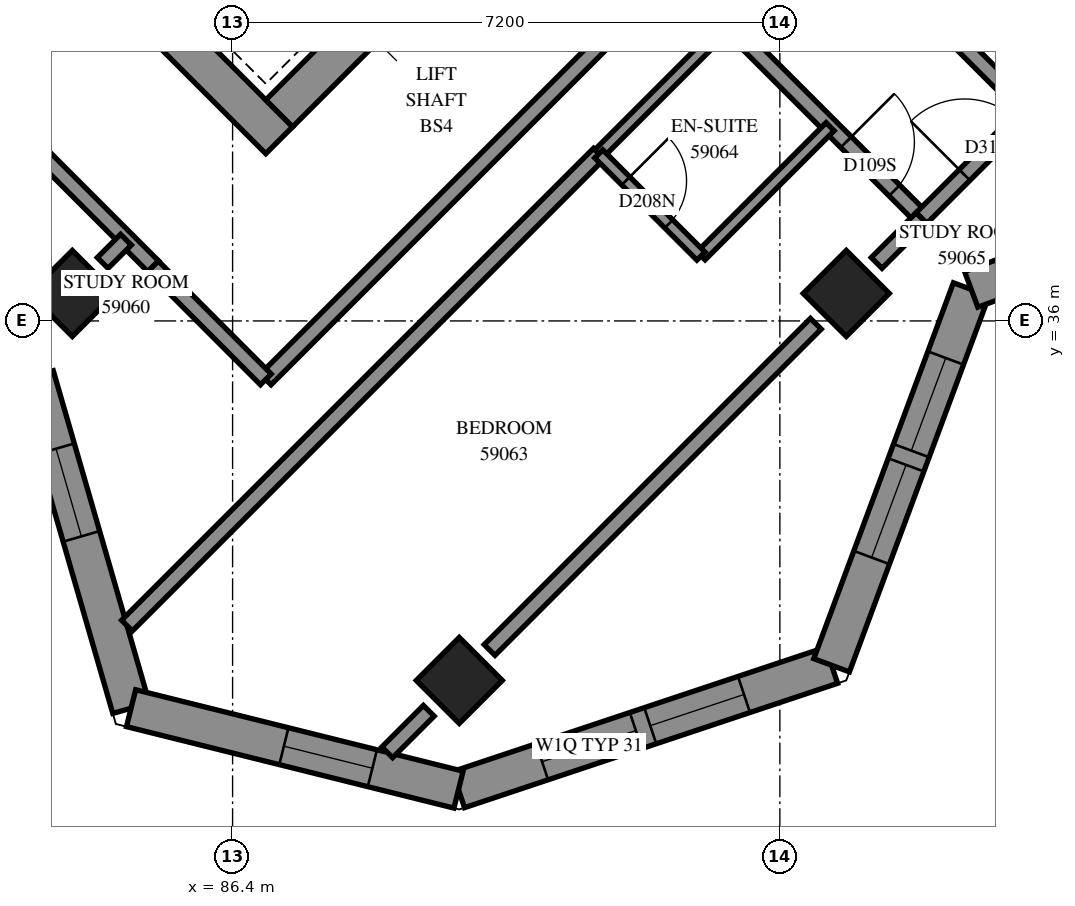
"""IFC4 building model, lengths in metres.
Left out: names, types, materials, properties, quantities, classifications, styles, units other than length and angle.
Written with IfcOpenShell. Run it as: python <this file> out.ifc"""

import sys

from ifc_helpers import new_model, si_unit, direction, frame, frame_2d, origin, origin_2d, place, context, subcontext, project, spatial, polyline, rectangle, outline, extrude, element, fill, save


model = new_model("IFC4")
c1 = context("Model", 3, precision=1e-05, world=origin(), true_north=direction((0.0, 1.0)))
c2 = subcontext(c1, "Body", "Model", "MODEL_VIEW")
j1 = project(units=[si_unit("LENGTHUNIT", "METRE"), si_unit("PLANEANGLEUNIT", "RADIAN")], contexts=[c1])
p1 = place(None, origin())
s1 = spatial("IfcSite", under=j1, at=p1, CompositionType="ELEMENT")
p2 = place(p1, origin())
s2 = spatial("IfcBuilding", under=s1, at=p2, CompositionType="ELEMENT")
p3 = place(p2, frame((0.0, 0.0, 216.8)))
s3 = spatial("IfcBuildingStorey", under=s2, at=p3, CompositionType="ELEMENT", Elevation=216.8)
for number, where, z_axis, x_axis in (
    (1, (84.291, 36.362, 0.0), (0.0, 0.0, 1.0), (0.707, -0.707, 0.0)),
    (2, (94.474, 36.362, 0.0), (0.0, 0.0, 1.0), (0.707, -0.707, 0.0)),
    (3, (89.382, 31.271, 0.0), (0.0, 0.0, 1.0), (0.707, -0.707, 0.0)),
):
    element("IfcColumn", number, at=place(p3, frame(where, z_axis=z_axis, x_axis=x_axis)), inside=s3, PredefinedType="COLUMN", context=c2, shape_type="SweptSolid", body=[
        extrude(rectangle(XDim=0.8, YDim=0.8, at=origin_2d()), origin(), (0.0, 0.0, 1.0), 3.1),
    ])
p4 = place(p3, frame((76.124, 49.267, -0.3), z_axis=(0.0, 0.0, 1.0), x_axis=(0.7071067812, -0.7071067812, 0.0)))
e4 = element("IfcWall", 4, at=p4, inside=s3, PredefinedType="SHEAR", context=c2, shape_type="SweptSolid", body=[
    extrude(rectangle(XDim=15.4, YDim=0.5, at=frame_2d((7.7, 0.0))), origin(), (0.0, 0.0, 1.0), 2.7),
])
p5 = place(p3, frame((87.013, 38.731, -0.3), z_axis=(0.0, 0.0, 1.0), x_axis=(0.7071067812, 0.7071067812, 0.0)))
e5 = element("IfcWall", 5, at=p5, inside=s3, PredefinedType="SHEAR", context=c2, shape_type="SweptSolid", body=[
    extrude(rectangle(XDim=14.4, YDim=0.5, at=frame_2d((7.2, 0.0))), origin(), (0.0, 0.0, 1.0), 2.7),
])
p6 = place(p5, frame((4.55, 0.0, 0.3)))
e6 = element("IfcOpeningElement", 6, at=p6, cuts=e5, PredefinedType="OPENING", context=c2, shape_type="SweptSolid", body=[
    extrude(rectangle(XDim=1.1, YDim=2.1, at=frame_2d((0.55, 1.05))), frame((0.0, 0.26, 0.0), z_axis=(0.0, -1.0, 0.0), x_axis=(1.0, 0.0, 0.0)), (0.0, 0.0, 1.0), 0.52),
])
p7 = place(p5, frame((11.35, 0.0, 0.3)))
e7 = element("IfcOpeningElement", 7, at=p7, cuts=e5, PredefinedType="OPENING", context=c2, shape_type="SweptSolid", body=[
    extrude(rectangle(XDim=1.1, YDim=2.1, at=frame_2d((0.55, 1.05))), frame((0.0, 0.26, 0.0), z_axis=(0.0, -1.0, 0.0), x_axis=(1.0, 0.0, 0.0)), (0.0, 0.0, 1.0), 0.52),
])
p8 = place(p3, frame((89.372, 29.834, 0.0), z_axis=(0.0, 0.0, 1.0), x_axis=(0.9486832981, 0.316227766, 0.0)))
e8 = element("IfcWall", 8, at=p8, inside=s3, PredefinedType="SOLIDWALL", context=c2, shape_type="SweptSolid", body=[
    extrude(outline(polyline([(-0.073, -0.25), (5.294, -0.25), (5.054, 0.25), (0.073, 0.25), (-0.073, -0.25)])), origin(), (0.0, 0.0, 1.0), 3.1),
])
p9 = place(p8, frame((1.159, 0.0, 0.45)))
e9 = element("IfcOpeningElement", 9, at=p9, cuts=e8, PredefinedType="OPENING", context=c2, shape_type="SweptSolid", body=[
    extrude(rectangle(XDim=1.3, YDim=2.5, at=frame_2d((0.65, 1.25))), frame((0.0, 0.26, 0.0), z_axis=(0.0, -1.0, 0.0), x_axis=(1.0, 0.0, 0.0)), (0.0, 0.0, 1.0), 0.52),
])
p10 = place(p8, frame((2.659, 0.0, 0.45)))
e10 = element("IfcOpeningElement", 10, at=p10, cuts=e8, PredefinedType="OPENING", context=c2, shape_type="SweptSolid", body=[
    extrude(rectangle(XDim=1.3, YDim=2.5, at=frame_2d((0.65, 1.25))), frame((0.0, 0.26, 0.0), z_axis=(0.0, -1.0, 0.0), x_axis=(1.0, 0.0, 0.0)), (0.0, 0.0, 1.0), 0.52),
])
p11 = place(p3, frame((94.281, 31.47, 0.0), z_axis=(0.0, 0.0, 1.0), x_axis=(0.3481903374, 0.9374238577, 0.0)))
e11 = element("IfcWall", 11, at=p11, inside=s3, PredefinedType="SOLIDWALL", context=c2, shape_type="SweptSolid", body=[
    extrude(outline(polyline([(-0.12, -0.25), (5.16, -0.25), (5.39, 0.25), (0.12, 0.25), (-0.12, -0.25)])), origin(), (0.0, 0.0, 1.0), 3.1),
])
p12 = place(p11, frame((1.512, 0.0, 0.45)))
e12 = element("IfcOpeningElement", 12, at=p12, cuts=e11, PredefinedType="OPENING", context=c2, shape_type="SweptSolid", body=[
    extrude(rectangle(XDim=1.3, YDim=2.5, at=frame_2d((0.65, 1.25))), frame((0.0, 0.26, 0.0), z_axis=(0.0, -1.0, 0.0), x_axis=(1.0, 0.0, 0.0)), (0.0, 0.0, 1.0), 0.52),
])
p13 = place(p11, frame((3.012, 0.0, 0.45)))
e13 = element("IfcOpeningElement", 13, at=p13, cuts=e11, PredefinedType="OPENING", context=c2, shape_type="SweptSolid", body=[
    extrude(rectangle(XDim=1.3, YDim=2.5, at=frame_2d((0.65, 1.25))), frame((0.0, 0.26, 0.0), z_axis=(0.0, -1.0, 0.0), x_axis=(1.0, 0.0, 0.0)), (0.0, 0.0, 1.0), 0.52),
])
p14 = place(p3, frame((96.118, 36.415, 0.0), z_axis=(0.0, 0.0, 1.0), x_axis=(0.9374238577, 0.3481903374, 0.0)))
e14 = element("IfcWall", 14, at=p14, inside=s3, PredefinedType="SOLIDWALL", context=c2, shape_type="SweptSolid", body=[
    extrude(outline(polyline([(0.115, -0.25), (5.395, -0.25), (5.155, 0.25), (-0.115, 0.25), (0.115, -0.25)])), origin(), (0.0, 0.0, 1.0), 3.1),
])
p15 = place(p14, frame((1.655, 0.0, 0.45)))
e15 = element("IfcOpeningElement", 15, at=p15, cuts=e14, PredefinedType="OPENING", context=c2, shape_type="SweptSolid", body=[
    extrude(rectangle(XDim=1.3, YDim=2.5, at=frame_2d((0.65, 1.25))), frame((0.0, 0.26, 0.0), z_axis=(0.0, -1.0, 0.0), x_axis=(1.0, 0.0, 0.0)), (0.0, 0.0, 1.0), 0.52),
])
p16 = place(p14, frame((3.155, 0.0, 0.45)))
e16 = element("IfcOpeningElement", 16, at=p16, cuts=e14, PredefinedType="OPENING", context=c2, shape_type="SweptSolid", body=[
    extrude(rectangle(XDim=1.3, YDim=2.5, at=frame_2d((0.65, 1.25))), frame((0.0, 0.26, 0.0), z_axis=(0.0, -1.0, 0.0), x_axis=(1.0, 0.0, 0.0)), (0.0, 0.0, 1.0), 0.52),
])
p17 = place(p3, frame((83.801, 35.276, 0.0), z_axis=(0.0, 0.0, 1.0), x_axis=(0.2777474642, -0.9606541241, 0.0)))
e17 = element("IfcWall", 17, at=p17, inside=s3, PredefinedType="SOLIDWALL", context=c2, shape_type="SweptSolid", body=[
    extrude(outline(polyline([(0.138, -0.25), (4.694, -0.25), (4.406, 0.25), (-0.138, 0.25), (0.138, -0.25)])), origin(), (0.0, 0.0, 1.0), 3.1),
])
p18 = place(p17, frame((0.997, 0.0, 0.45)))
e18 = element("IfcOpeningElement", 18, at=p18, cuts=e17, PredefinedType="OPENING", context=c2, shape_type="SweptSolid", body=[
    extrude(rectangle(XDim=1.2, YDim=2.5, at=frame_2d((0.6, 1.25))), frame((0.0, 0.26, 0.0), z_axis=(0.0, -1.0, 0.0), x_axis=(1.0, 0.0, 0.0)), (0.0, 0.0, 1.0), 0.52),
])
p19 = place(p3, frame((85.064, 30.905, 0.0), z_axis=(0.0, 0.0, 1.0), x_axis=(0.9704161722, -0.2414383002, 0.0)))
e19 = element("IfcWall", 19, at=p19, inside=s3, PredefinedType="SOLIDWALL", context=c2, shape_type="SweptSolid", body=[
    extrude(outline(polyline([(-0.144, -0.25), (4.512, -0.25), (4.367, 0.25), (0.144, 0.25), (-0.144, -0.25)])), origin(), (0.0, 0.0, 1.0), 3.1),
])
p20 = place(p19, frame((2.071, 0.0, 0.45)))
e20 = element("IfcOpeningElement", 20, at=p20, cuts=e19, PredefinedType="OPENING", context=c2, shape_type="SweptSolid", body=[
    extrude(rectangle(XDim=1.2, YDim=2.5, at=frame_2d((0.6, 1.25))), frame((0.0, 0.26, 0.0), z_axis=(0.0, -1.0, 0.0), x_axis=(1.0, 0.0, 0.0)), (0.0, 0.0, 1.0), 0.52),
])
p21 = place(p3, frame((85.01, 31.992, 0.0), z_axis=(0.0, 0.0, 1.0), x_axis=(0.7071010869, 0.7071124754, 0.0)))
e21 = element("IfcWall", 21, at=p21, inside=s3, PredefinedType="PARTITIONING", context=c2, shape_type="SweptSolid", body=[
    extrude(rectangle(XDim=8.781, YDim=0.2, at=frame_2d((4.39, 0.0))), origin(), (0.0, 0.0, 1.0), 3.1),
])
p22 = place(p3, frame((86.835, 35.231, 0.0), z_axis=(0.0, 0.0, 1.0), x_axis=(0.7071067812, 0.7071067812, 0.0)))
e22 = element("IfcWall", 22, at=p22, inside=s3, PredefinedType="PARTITIONING", context=c2, shape_type="SweptSolid", body=[
    extrude(rectangle(XDim=7.6, YDim=0.2, at=frame_2d((3.8, 0.0))), origin(), (0.0, 0.0, 1.0), 3.1),
])
p23 = place(p22, frame((6.346, 0.0, 0.0)))
e23 = element("IfcOpeningElement", 23, at=p23, cuts=e22, PredefinedType="OPENING", context=c2, shape_type="SweptSolid", body=[
    extrude(rectangle(XDim=1.0, YDim=2.1, at=frame_2d((0.5, 1.05))), frame((0.0, 0.11, 0.0), z_axis=(0.0, -1.0, 0.0), x_axis=(1.0, 0.0, 0.0)), (0.0, 0.0, 1.0), 0.22),
])
p24 = place(p3, frame((80.522, 41.553, 0.0), z_axis=(0.0, 0.0, 1.0), x_axis=(0.7071067812, -0.7071067812, 0.0)))
e24 = element("IfcWall", 24, at=p24, inside=s3, PredefinedType="PARTITIONING", context=c2, shape_type="SweptSolid", body=[
    extrude(rectangle(XDim=6.836, YDim=0.2, at=frame_2d((3.418, 0.0))), origin(), (0.0, 0.0, 1.0), 3.1),
])
p25 = place(p3, frame((89.781, 31.671, 0.0), z_axis=(0.0, 0.0, 1.0), x_axis=(0.7071067812, 0.7071067812, 0.0)))
e25 = element("IfcWall", 25, at=p25, inside=s3, PredefinedType="PARTITIONING", context=c2, shape_type="SweptSolid", body=[
    extrude(rectangle(XDim=6.07, YDim=0.2, at=frame_2d((3.035, 0.0))), origin(), (0.0, 0.0, 1.0), 2.6),
])
p26 = place(p3, frame((93.623, 42.015, 0.0), z_axis=(0.0, 0.0, 1.0), x_axis=(0.7071067812, -0.7071067812, 0.0)))
e26 = element("IfcWall", 26, at=p26, inside=s3, PredefinedType="PARTITIONING", context=c2, shape_type="SweptSolid", body=[
    extrude(rectangle(XDim=4.599, YDim=0.2, at=frame_2d((2.3, 0.0))), origin(), (0.0, 0.0, 1.0), 3.1),
])
p27 = place(p26, frame((1.349, 0.0, 0.0)))
e27 = element("IfcOpeningElement", 27, at=p27, cuts=e26, PredefinedType="OPENING", context=c2, shape_type="SweptSolid", body=[
    extrude(rectangle(XDim=0.9, YDim=2.1, at=frame_2d((0.45, 1.05))), frame((0.0, 0.11, 0.0), z_axis=(0.0, -1.0, 0.0), x_axis=(1.0, 0.0, 0.0)), (0.0, 0.0, 1.0), 0.22),
])
p28 = place(p3, frame((92.216, 40.608, 0.0), z_axis=(0.0, 0.0, 1.0), x_axis=(0.7071067812, -0.7071067812, 0.0)))
e28 = element("IfcWall", 28, at=p28, inside=s3, PredefinedType="PARTITIONING", context=c2, shape_type="SweptSolid", body=[
    extrude(rectangle(XDim=4.599, YDim=0.2, at=frame_2d((2.3, 0.0))), origin(), (0.0, 0.0, 1.0), 3.1),
])
p29 = place(p28, frame((3.189, 0.0, 0.0)))
e29 = element("IfcOpeningElement", 29, at=p29, cuts=e28, PredefinedType="OPENING", context=c2, shape_type="SweptSolid", body=[
    extrude(rectangle(XDim=0.9, YDim=2.1, at=frame_2d((0.45, 1.05))), frame((0.0, 0.11, 0.0), z_axis=(0.0, -1.0, 0.0), x_axis=(1.0, 0.0, 0.0)), (0.0, 0.0, 1.0), 0.22),
])
for number, where, z_axis, x_axis in (
    (30, (92.563, 36.857, 0.0), (0.0, 0.0, 1.0), (0.707, 0.707, 0.0)),
    (31, (91.219, 38.201, 0.0), (0.0, 0.0, 1.0), (0.707, 0.707, 0.0)),
):
    element("IfcWall", number, at=place(p3, frame(where, z_axis=z_axis, x_axis=x_axis)), inside=s3, PredefinedType="PARTITIONING", context=c2, shape_type="SweptSolid", body=[
        extrude(rectangle(XDim=2.401, YDim=0.15, at=frame_2d((1.201, 0.0))), origin(), (0.0, 0.0, 1.0), 3.1),
    ])
p30 = place(p3, frame((85.353, 36.717, 0.0), z_axis=(0.0, 0.0, 1.0), x_axis=(0.7066304548, -0.7075827869, 0.0)))
e32 = element("IfcWall", 32, at=p30, inside=s3, PredefinedType="PARTITIONING", context=c2, shape_type="SweptSolid", body=[
    extrude(rectangle(XDim=2.1, YDim=0.2, at=frame_2d((1.05, 0.0))), origin(), (0.0, 0.0, 1.0), 3.1),
])
p31 = place(p3, frame((95.463, 37.353, 0.0), z_axis=(0.0, 0.0, 1.0), x_axis=(0.7071067812, 0.7071067812, 0.0)))
e33 = element("IfcWall", 33, at=p31, inside=s3, PredefinedType="PARTITIONING", context=c2, shape_type="SweptSolid", body=[
    extrude(rectangle(XDim=2.0, YDim=0.2, at=frame_2d((1.0, 0.0))), origin(), (0.0, 0.0, 1.0), 2.6),
])
p32 = place(p31, frame((0.802, 0.0, 0.0)))
e34 = element("IfcOpeningElement", 34, at=p32, cuts=e33, PredefinedType="OPENING", context=c2, shape_type="SweptSolid", body=[
    extrude(rectangle(XDim=1.0, YDim=2.1, at=frame_2d((0.5, 1.05))), frame((0.0, 0.11, 0.0), z_axis=(0.0, -1.0, 0.0), x_axis=(1.0, 0.0, 0.0)), (0.0, 0.0, 1.0), 0.22),
])
p33 = place(p3, frame((91.217, 38.197, 0.0), z_axis=(0.0, 0.0, 1.0), x_axis=(0.7071067812, -0.7071067812, 0.0)))
e35 = element("IfcWall", 35, at=p33, inside=s3, PredefinedType="PARTITIONING", context=c2, shape_type="SweptSolid", body=[
    extrude(rectangle(XDim=1.901, YDim=0.15, at=frame_2d((0.95, 0.0))), origin(), (0.0, 0.0, 1.0), 3.1),
])
p34 = place(p33, frame((0.502, 0.0, 0.0)))
e36 = element("IfcOpeningElement", 36, at=p34, cuts=e35, PredefinedType="OPENING", context=c2, shape_type="SweptSolid", body=[
    extrude(rectangle(XDim=0.8, YDim=2.1, at=frame_2d((0.4, 1.05))), frame((0.0, 0.085, 0.0), z_axis=(0.0, -1.0, 0.0), x_axis=(1.0, 0.0, 0.0)), (0.0, 0.0, 1.0), 0.17),
])
p35 = place(p3, frame((94.873, 36.763, 0.0), z_axis=(0.0, 0.0, 1.0), x_axis=(0.7071067812, 0.7071067812, 0.0)))
e37 = element("IfcWall", 37, at=p35, inside=s3, PredefinedType="PARTITIONING", context=c2, shape_type="SweptSolid", body=[
    extrude(rectangle(XDim=0.834, YDim=0.2, at=frame_2d((0.417, 0.0))), origin(), (0.0, 0.0, 1.0), 2.6),
])
p36 = place(p3, frame((88.435, 30.325, 0.0), z_axis=(0.0, 0.0, 1.0), x_axis=(0.7071067812, 0.7071067812, 0.0)))
e38 = element("IfcWall", 38, at=p36, inside=s3, PredefinedType="PARTITIONING", context=c2, shape_type="SweptSolid", body=[
    extrude(rectangle(XDim=0.773, YDim=0.2, at=frame_2d((0.386, 0.0))), origin(), (0.0, 0.0, 1.0), 3.1),
])
p37 = place(p3, frame((84.691, 36.763, 0.0), z_axis=(0.0, 0.0, 1.0), x_axis=(0.7071067812, 0.7071067812, 0.0)))
e39 = element("IfcWall", 39, at=p37, inside=s3, PredefinedType="PARTITIONING", context=c2, shape_type="SweptSolid", body=[
    extrude(rectangle(XDim=0.433, YDim=0.2, at=frame_2d((0.216, 0.0))), origin(), (0.0, 0.0, 1.0), 3.1),
])
p38 = place(p9, origin())
e40 = element("IfcWindow", 40, at=p38, inside=s3, PartitioningType="SINGLE_PANEL", PredefinedType="WINDOW", context=c2, shape_type="SweptSolid", body=[
    extrude(rectangle(XDim=1.3, YDim=2.5, at=frame_2d((0.65, 1.25))), frame((0.0, 0.18, 0.0), z_axis=(0.0, -1.0, 0.0), x_axis=(1.0, 0.0, 0.0)), (0.0, 0.0, 1.0), 0.06),
])
fill(e9, e40)
p39 = place(p10, origin())
e41 = element("IfcWindow", 41, at=p39, inside=s3, PartitioningType="SINGLE_PANEL", PredefinedType="WINDOW", context=c2, shape_type="SweptSolid", body=[
    extrude(rectangle(XDim=1.3, YDim=2.5, at=frame_2d((0.65, 1.25))), frame((0.0, 0.18, 0.0), z_axis=(0.0, -1.0, 0.0), x_axis=(1.0, 0.0, 0.0)), (0.0, 0.0, 1.0), 0.06),
])
fill(e10, e41)
p40 = place(p12, origin())
e42 = element("IfcWindow", 42, at=p40, inside=s3, PartitioningType="SINGLE_PANEL", PredefinedType="WINDOW", context=c2, shape_type="SweptSolid", body=[
    extrude(rectangle(XDim=1.3, YDim=2.5, at=frame_2d((0.65, 1.25))), frame((0.0, 0.18, 0.0), z_axis=(0.0, -1.0, 0.0), x_axis=(1.0, 0.0, 0.0)), (0.0, 0.0, 1.0), 0.06),
])
fill(e12, e42)
p41 = place(p13, origin())
e43 = element("IfcWindow", 43, at=p41, inside=s3, PartitioningType="SINGLE_PANEL", PredefinedType="WINDOW", context=c2, shape_type="SweptSolid", body=[
    extrude(rectangle(XDim=1.3, YDim=2.5, at=frame_2d((0.65, 1.25))), frame((0.0, 0.18, 0.0), z_axis=(0.0, -1.0, 0.0), x_axis=(1.0, 0.0, 0.0)), (0.0, 0.0, 1.0), 0.06),
])
fill(e13, e43)
p42 = place(p18, origin())
e44 = element("IfcWindow", 44, at=p42, inside=s3, PartitioningType="SINGLE_PANEL", PredefinedType="WINDOW", context=c2, shape_type="SweptSolid", body=[
    extrude(rectangle(XDim=1.2, YDim=2.5, at=frame_2d((0.6, 1.25))), frame((0.0, 0.18, 0.0), z_axis=(0.0, -1.0, 0.0), x_axis=(1.0, 0.0, 0.0)), (0.0, 0.0, 1.0), 0.06),
])
fill(e18, e44)
p43 = place(p20, origin())
e45 = element("IfcWindow", 45, at=p43, inside=s3, PartitioningType="SINGLE_PANEL", PredefinedType="WINDOW", context=c2, shape_type="SweptSolid", body=[
    extrude(rectangle(XDim=1.2, YDim=2.5, at=frame_2d((0.6, 1.25))), frame((0.0, 0.18, 0.0), z_axis=(0.0, -1.0, 0.0), x_axis=(1.0, 0.0, 0.0)), (0.0, 0.0, 1.0), 0.06),
])
fill(e20, e45)
p44 = place(p29, origin())
e46 = element("IfcDoor", 46, at=p44, inside=s3, OperationType="SINGLE_SWING_LEFT", PredefinedType="DOOR", context=c2, shape_type="SweptSolid", body=[
    extrude(rectangle(XDim=0.9, YDim=2.1, at=frame_2d((0.45, 1.05))), frame((0.0, 0.025, 0.0), z_axis=(0.0, -1.0, 0.0), x_axis=(1.0, 0.0, 0.0)), (0.0, 0.0, 1.0), 0.05),
])
fill(e29, e46)
p45 = place(p34, origin())
e47 = element("IfcDoor", 47, at=p45, inside=s3, OperationType="SINGLE_SWING_RIGHT", PredefinedType="DOOR", context=c2, shape_type="SweptSolid", body=[
    extrude(rectangle(XDim=0.8, YDim=2.1, at=frame_2d((0.4, 1.05))), frame((0.0, 0.025, 0.0), z_axis=(0.0, -1.0, 0.0), x_axis=(1.0, 0.0, 0.0)), (0.0, 0.0, 1.0), 0.05),
])
fill(e36, e47)
p46 = place(p32, origin())
e48 = element("IfcDoor", 48, at=p46, inside=s3, OperationType="SINGLE_SWING_RIGHT", PredefinedType="DOOR", context=c2, shape_type="SweptSolid", body=[
    extrude(rectangle(XDim=1.0, YDim=2.1, at=frame_2d((0.5, 1.05))), frame((0.0, 0.025, 0.0), z_axis=(0.0, -1.0, 0.0), x_axis=(1.0, 0.0, 0.0)), (0.0, 0.0, 1.0), 0.05),
])
fill(e34, e48)
save(model, sys.argv[1])
